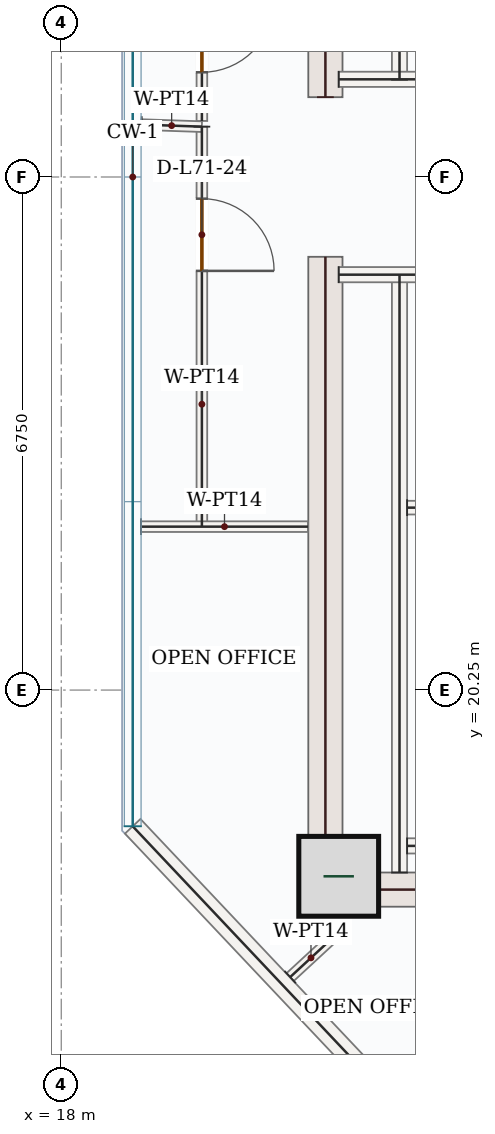
"""IFC4 building model, lengths in metres.
Left out: names, types, materials, properties, quantities, classifications, styles, units other than length and angle.
Written with IfcOpenShell. Run it as: python <this file> out.ifc"""

import sys

from ifc_helpers import new_model, si_unit, direction, frame, frame_2d, origin, origin_2d, place, context, subcontext, project, spatial, rectangle, extrude, source, transform, mapped, element, fill, save


model = new_model("IFC4")
c1 = context("Model", 3, precision=1e-05, world=origin(), true_north=direction((0.0, 1.0)))
c2 = subcontext(c1, "Body", "Model", "MODEL_VIEW")
j1 = project(units=[si_unit("LENGTHUNIT", "METRE"), si_unit("PLANEANGLEUNIT", "RADIAN")], contexts=[c1])
p1 = place(None, origin())
s1 = spatial("IfcSite", under=j1, at=p1, CompositionType="ELEMENT")
p2 = place(p1, origin())
s2 = spatial("IfcBuilding", under=s1, at=p2, CompositionType="ELEMENT")
p3 = place(p2, frame((0.0, 0.0, 295.35)))
s3 = spatial("IfcBuildingStorey", under=s2, at=p3, CompositionType="ELEMENT", Elevation=295.35)
m1 = source(origin(), c2, "Body", "SweptSolid", [
    extrude(rectangle(XDim=8.55, YDim=0.45, at=frame_2d((4.275, 0.0))), origin(), (0.0, 0.0, 1.0), 3.5),
])
for number, where, z_axis, x_axis in (
    (1, (21.475, 17.4, 0.0), (0.0, 0.0, 1.0), (0.0, 1.0, 0.0)),
    (2, (21.475, 28.05, 0.0), (0.0, 0.0, 1.0), (0.0, 1.0, 0.0)),
):
    element("IfcWall", number, at=place(p3, frame(where, z_axis=z_axis, x_axis=x_axis)), inside=s3, PredefinedType="SHEAR", context=c2, shape_type="MappedRepresentation", body=[
        mapped(m1, transform((0.0, 0.0, 0.0), x_axis=(1.0, 0.0, 0.0), y_axis=(0.0, 1.0, 0.0), z_axis=(0.0, 0.0, 1.0), scale=1.0)),
    ])
m2 = source(origin(), c2, "Body", "SweptSolid", [
    extrude(rectangle(XDim=7.1, YDim=0.45, at=frame_2d((3.55, 0.0))), origin(), (0.0, 0.0, 1.0), 3.5),
])
p4 = place(p3, frame((21.7, 17.625, 0.0), z_axis=(0.0, 0.0, 1.0), x_axis=(1.0, 0.0, 0.0)))
e3 = element("IfcWall", 3, at=p4, inside=s3, PredefinedType="SHEAR", context=c2, shape_type="MappedRepresentation", body=[
    mapped(m2, transform((0.0, 0.0, 0.0), x_axis=(1.0, 0.0, 0.0), y_axis=(0.0, 1.0, 0.0), z_axis=(0.0, 0.0, 1.0), scale=1.0)),
])
m3 = source(origin(), c2, "Body", "SweptSolid", [
    extrude(rectangle(XDim=1.05, YDim=1.05, at=origin_2d()), origin(), (0.0, 0.0, 1.0), 3.75),
])
p5 = place(p3, frame((21.65, 17.8, 0.0), z_axis=(0.0, 0.0, 1.0), x_axis=(1.0, 0.0, 0.0)))
e4 = element("IfcColumn", 4, at=p5, inside=s3, PredefinedType="COLUMN", context=c2, shape_type="MappedRepresentation", body=[
    mapped(m3, transform((0.0, 0.0, 0.0), x_axis=(1.0, 0.0, 0.0), y_axis=(0.0, 1.0, 0.0), z_axis=(0.0, 0.0, 1.0), scale=1.0)),
])
m4 = source(origin(), c2, "Body", "SweptSolid", [
    extrude(rectangle(XDim=10.274, YDim=0.28, at=frame_2d((5.137, 0.0))), origin(), (0.0, 0.0, 1.0), 3.5),
])
p6 = place(p3, frame((25.992, 10.987, 0.0), z_axis=(0.0, 0.0, 1.0), x_axis=(-0.68643580465, 0.727190405667, 0.0)))
e5 = element("IfcWall", 5, at=p6, inside=s3, PredefinedType="SOLIDWALL", context=c2, shape_type="MappedRepresentation", body=[
    mapped(m4, transform((0.0, 0.0, 0.0), x_axis=(1.0, 0.0, 0.0), y_axis=(0.0, 1.0, 0.0), z_axis=(0.0, 0.0, 1.0), scale=1.0)),
])
m5 = source(origin(), c2, "Body", "SweptSolid", [
    extrude(rectangle(XDim=7.87, YDim=0.2, at=frame_2d((3.935, 0.0))), origin(), (0.0, 0.0, 1.0), 3.5),
])
for number, where, z_axis, x_axis in (
    (6, (22.45, 17.85, 0.0), (0.0, 0.0, 1.0), (0.0, 1.0, 0.0)),
    (7, (22.45, 28.28, 0.0), (0.0, 0.0, 1.0), (0.0, 1.0, 0.0)),
):
    element("IfcWall", number, at=place(p3, frame(where, z_axis=z_axis, x_axis=x_axis)), inside=s3, PredefinedType="SOLIDWALL", context=c2, shape_type="MappedRepresentation", body=[
        mapped(m5, transform((0.0, 0.0, 0.0), x_axis=(1.0, 0.0, 0.0), y_axis=(0.0, 1.0, 0.0), z_axis=(0.0, 0.0, 1.0), scale=1.0)),
    ])
m6 = source(origin(), c2, "Body", "SweptSolid", [
    extrude(rectangle(XDim=4.25, YDim=0.2, at=frame_2d((2.125, 0.0))), origin(), (0.0, 0.0, 1.0), 3.5),
])
for number, where, z_axis, x_axis in (
    (8, (21.65, 25.715, 0.0), (0.0, 0.0, 1.0), (1.0, 0.0, 0.0)),
    (9, (21.65, 28.285, 0.0), (0.0, 0.0, 1.0), (1.0, 0.0, 0.0)),
):
    element("IfcWall", number, at=place(p3, frame(where, z_axis=z_axis, x_axis=x_axis)), inside=s3, PredefinedType="SOLIDWALL", context=c2, shape_type="MappedRepresentation", body=[
        mapped(m6, transform((0.0, 0.0, 0.0), x_axis=(1.0, 0.0, 0.0), y_axis=(0.0, 1.0, 0.0), z_axis=(0.0, 0.0, 1.0), scale=1.0)),
    ])
m7 = source(origin(), c2, "Body", "SweptSolid", [
    extrude(rectangle(XDim=3.25, YDim=0.2, at=frame_2d((1.625, 0.0))), origin(), (0.0, 0.0, 1.0), 3.5),
])
p7 = place(p3, frame((22.55, 18.2, 0.0), z_axis=(0.0, 0.0, 1.0), x_axis=(1.0, 0.0, 0.0)))
e10 = element("IfcWall", 10, at=p7, inside=s3, PredefinedType="SOLIDWALL", context=c2, shape_type="MappedRepresentation", body=[
    mapped(m7, transform((0.0, 0.0, 0.0), x_axis=(1.0, 0.0, 0.0), y_axis=(0.0, 1.0, 0.0), z_axis=(0.0, 0.0, 1.0), scale=1.0)),
])
m8 = source(origin(), c2, "Body", "SweptSolid", [
    extrude(rectangle(XDim=3.25, YDim=0.18, at=frame_2d((1.625, 0.0))), origin(), (0.0, 0.0, 1.0), 3.5),
])
p8 = place(p3, frame((22.55, 22.65, 0.0), z_axis=(0.0, 0.0, 1.0), x_axis=(1.0, 0.0, 0.0)))
e11 = element("IfcWall", 11, at=p8, inside=s3, PredefinedType="PARTITIONING", context=c2, shape_type="MappedRepresentation", body=[
    mapped(m8, transform((0.0, 0.0, 0.0), x_axis=(1.0, 0.0, 0.0), y_axis=(0.0, 1.0, 0.0), z_axis=(0.0, 0.0, 1.0), scale=1.0)),
])
m9 = source(origin(), c2, "Body", "SweptSolid", [
    extrude(rectangle(XDim=0.745, YDim=0.14, at=frame_2d((0.373, 0.0))), origin(), (0.0, 0.0, 1.0), 3.5),
])
p9 = place(p3, frame((21.012, 16.474, 0.0), z_axis=(0.0, 0.0, 1.0), x_axis=(0.734262819455, 0.678865312095, 0.0)))
e12 = element("IfcWall", 12, at=p9, inside=s3, PredefinedType="PARTITIONING", context=c2, shape_type="MappedRepresentation", body=[
    mapped(m9, transform((0.0, 0.0, 0.0), x_axis=(1.0, 0.0, 0.0), y_axis=(0.0, 1.0, 0.0), z_axis=(0.0, 0.0, 1.0), scale=1.0)),
])
p10 = place(p3, frame((19.85, 27.662, 0.0), z_axis=(0.0, 0.0, 1.0), x_axis=(0.0, -1.0, 0.0)))
e13 = element("IfcWall", 13, at=p10, inside=s3, PredefinedType="PARTITIONING", context=c2, shape_type="SweptSolid", body=[
    extrude(rectangle(XDim=5.256, YDim=0.14, at=frame_2d((2.628, 0.0))), origin(), (0.0, 0.0, 1.0), 3.5),
])
p11 = place(p10, frame((0.948, 0.0, 0.0)))
e14 = element("IfcOpeningElement", 14, at=p11, cuts=e13, PredefinedType="OPENING", context=c2, shape_type="SweptSolid", body=[
    extrude(rectangle(XDim=0.95, YDim=2.15, at=frame_2d((0.475, 1.075))), frame((0.0, 0.08, 0.0), z_axis=(0.0, -1.0, 0.0), x_axis=(1.0, 0.0, 0.0)), (0.0, 0.0, 1.0), 0.16),
])
m10 = source(origin(), c2, "Body", "SweptSolid", [
    extrude(rectangle(XDim=2.195, YDim=0.14, at=frame_2d((1.098, 0.0))), origin(), (0.0, 0.0, 1.0), 3.5),
])
p12 = place(p3, frame((19.05, 22.4, 0.0), z_axis=(0.0, 0.0, 1.0), x_axis=(1.0, 0.0, 0.0)))
e15 = element("IfcWall", 15, at=p12, inside=s3, PredefinedType="PARTITIONING", context=c2, shape_type="MappedRepresentation", body=[
    mapped(m10, transform((0.0, 0.0, 0.0), x_axis=(1.0, 0.0, 0.0), y_axis=(0.0, 1.0, 0.0), z_axis=(0.0, 0.0, 1.0), scale=1.0)),
])
m11 = source(origin(), c2, "Body", "SweptSolid", [
    extrude(rectangle(XDim=0.795, YDim=0.14, at=frame_2d((0.397, 0.0))), origin(), (0.0, 0.0, 1.0), 3.5),
])
p13 = place(p3, frame((19.055, 27.689, 0.0), z_axis=(0.0, 0.0, 1.0), x_axis=(0.999418697686, -0.034092033019, 0.0)))
e16 = element("IfcWall", 16, at=p13, inside=s3, PredefinedType="PARTITIONING", context=c2, shape_type="MappedRepresentation", body=[
    mapped(m11, transform((0.0, 0.0, 0.0), x_axis=(1.0, 0.0, 0.0), y_axis=(0.0, 1.0, 0.0), z_axis=(0.0, 0.0, 1.0), scale=1.0)),
])
p14 = place(p3, frame((19.851, 31.598, 0.0), z_axis=(0.0, 0.0, 1.0), x_axis=(-0.000316215517, -0.999999950004, 0.0)))
e17 = element("IfcWall", 17, at=p14, inside=s3, PredefinedType="PARTITIONING", context=c2, shape_type="SweptSolid", body=[
    extrude(rectangle(XDim=3.86, YDim=0.14, at=frame_2d((1.93, 0.0))), origin(), (0.0, 0.0, 1.0), 3.5),
])
p15 = place(p14, frame((2.27, 0.0, 0.0)))
e18 = element("IfcOpeningElement", 18, at=p15, cuts=e17, PredefinedType="OPENING", context=c2, shape_type="SweptSolid", body=[
    extrude(rectangle(XDim=0.95, YDim=2.15, at=frame_2d((0.475, 1.075))), frame((0.0, 0.08, 0.0), z_axis=(0.0, -1.0, 0.0), x_axis=(1.0, 0.0, 0.0)), (0.0, 0.0, 1.0), 0.16),
])
m12 = source(origin(), c2, "Body", "SweptSolid", [
    extrude(rectangle(XDim=0.95, YDim=2.15, at=frame_2d((0.475, 1.075))), frame((0.0, 0.025, 0.0), z_axis=(0.0, -1.0, 0.0), x_axis=(1.0, 0.0, 0.0)), (0.0, 0.0, 1.0), 0.05),
])
p16 = place(p15, origin())
e19 = element("IfcDoor", 19, at=p16, inside=s3, OperationType="SINGLE_SWING_LEFT", PredefinedType="DOOR", context=c2, shape_type="MappedRepresentation", body=[
    mapped(m12, transform((0.0, 0.0, 0.0), x_axis=(1.0, 0.0, 0.0), y_axis=(0.0, 1.0, 0.0), z_axis=(0.0, 0.0, 1.0), scale=1.0)),
])
fill(e18, e19)
p17 = place(p11, origin())
e20 = element("IfcDoor", 20, at=p17, inside=s3, OperationType="SINGLE_SWING_RIGHT", PredefinedType="DOOR", context=c2, shape_type="MappedRepresentation", body=[
    mapped(m12, transform((0.0, 0.0, 0.0), x_axis=(1.0, 0.0, 0.0), y_axis=(0.0, 1.0, 0.0), z_axis=(0.0, 0.0, 1.0), scale=1.0)),
])
fill(e14, e20)
save(model, sys.argv[1])
